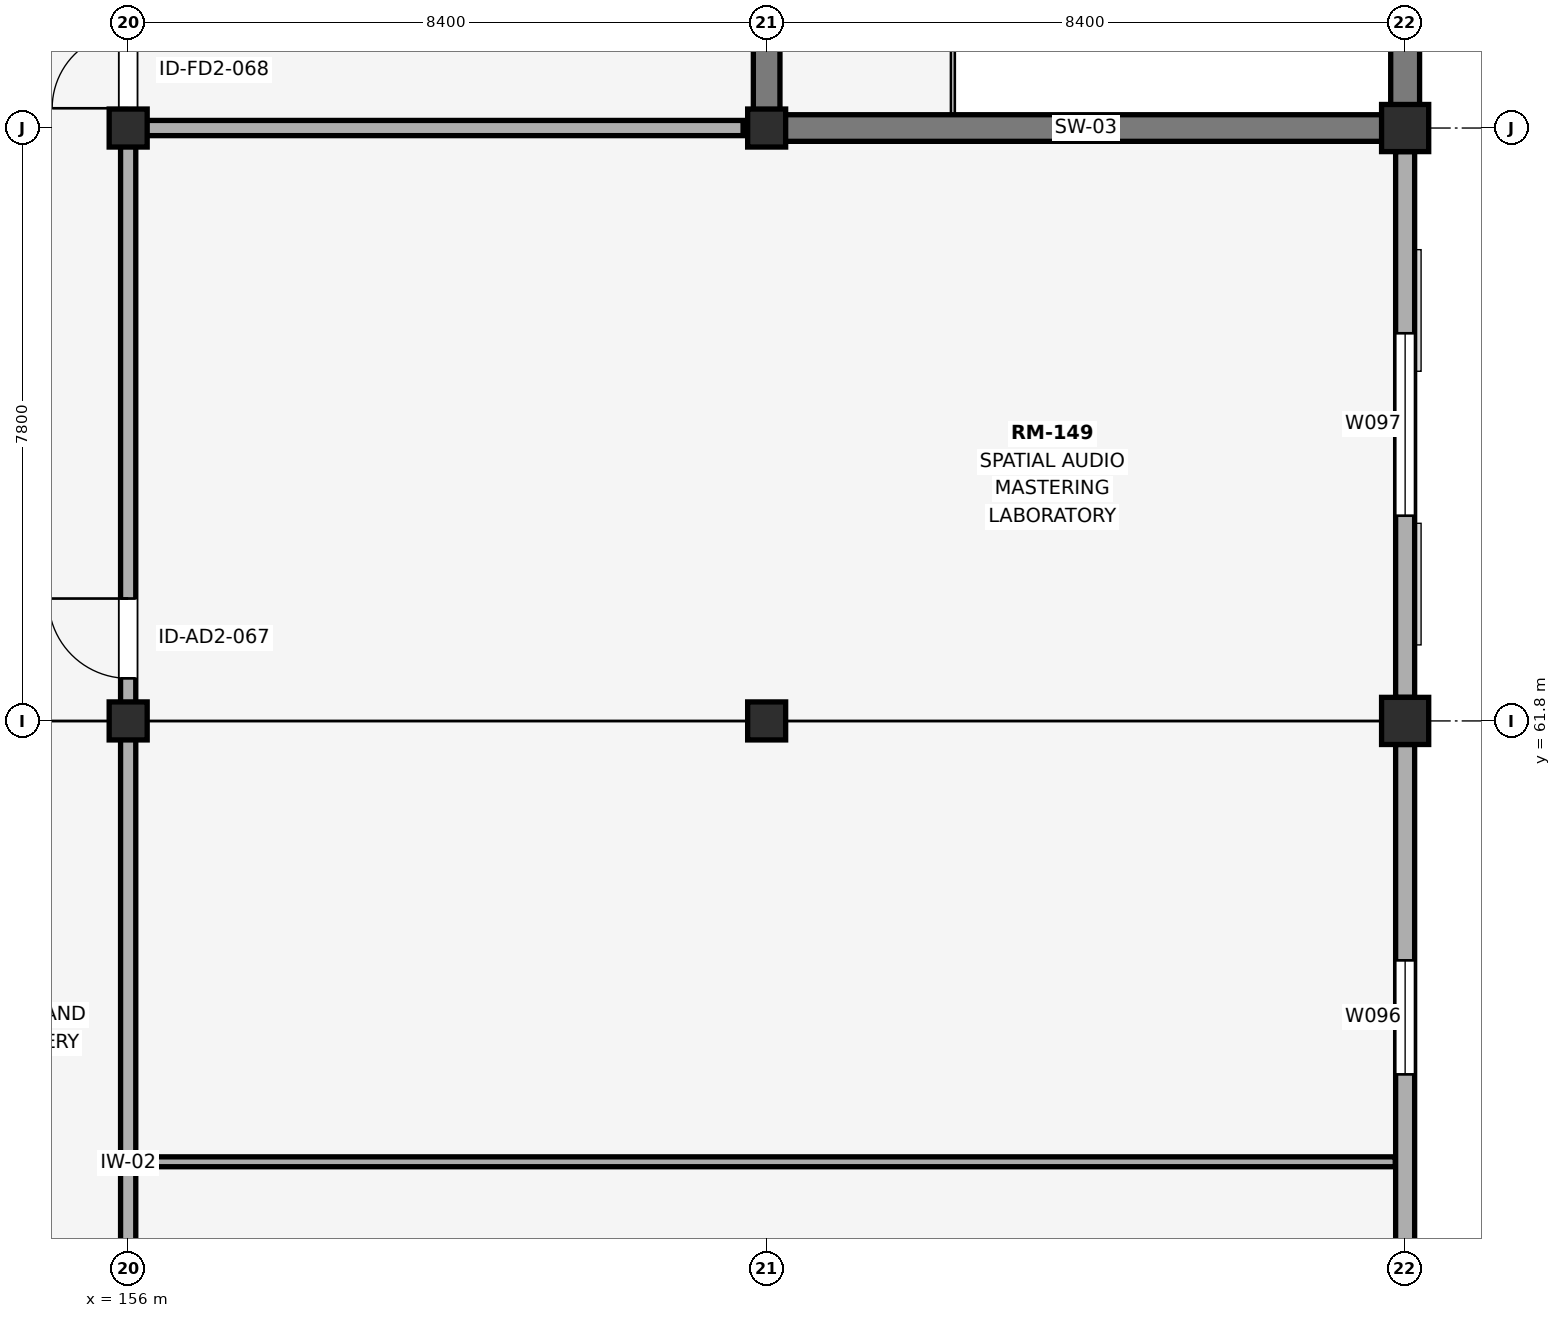
"""IFC4 building model, lengths in metres.
Left out: names, types, materials, properties, quantities, classifications, styles, units other than length and angle.
Written with IfcOpenShell. Run it as: python <this file> out.ifc"""

import sys

from ifc_helpers import new_model, si_unit, direction, frame, frame_2d, origin, origin_2d, place, context, subcontext, project, spatial, rectangle, extrude, element, fill, save


model = new_model("IFC4")
c1 = context("Model", 3, precision=1e-05, world=origin(), true_north=direction((0.0, 1.0)))
c2 = subcontext(c1, "Body", "Model", "MODEL_VIEW")
j1 = project(units=[si_unit("LENGTHUNIT", "METRE"), si_unit("PLANEANGLEUNIT", "RADIAN")], contexts=[c1])
p1 = place(None, origin())
s1 = spatial("IfcSite", under=j1, at=p1, CompositionType="ELEMENT")
p2 = place(p1, origin())
s2 = spatial("IfcBuilding", under=s1, at=p2, CompositionType="ELEMENT")
p3 = place(p2, frame((0.0, 0.0, 24.0)))
s3 = spatial("IfcBuildingStorey", under=s2, at=p3, CompositionType="ELEMENT", Elevation=24.0)
for number, where, z_axis, x_axis in (
    (1, (156.0, 61.8, 0.0), (0.0, 0.0, 1.0), (1.0, 0.0, 0.0)),
    (2, (156.0, 69.6, 0.0), (0.0, 0.0, 1.0), (1.0, 0.0, 0.0)),
    (3, (164.4, 61.8, 0.0), (0.0, 0.0, 1.0), (1.0, 0.0, 0.0)),
    (4, (164.4, 69.6, 0.0), (0.0, 0.0, 1.0), (1.0, 0.0, 0.0)),
):
    element("IfcColumn", number, at=place(p3, frame(where, z_axis=z_axis, x_axis=x_axis)), inside=s3, PredefinedType="COLUMN", context=c2, shape_type="SweptSolid", body=[
        extrude(rectangle(XDim=0.5, YDim=0.5, at=origin_2d()), origin(), (0.0, 0.0, 1.0), 4.5),
    ])
for number, where, z_axis, x_axis in (
    (5, (172.8, 61.8, 0.0), (0.0, 0.0, 1.0), (1.0, 0.0, 0.0)),
    (6, (172.8, 69.6, 0.0), (0.0, 0.0, 1.0), (1.0, 0.0, 0.0)),
):
    element("IfcColumn", number, at=place(p3, frame(where, z_axis=z_axis, x_axis=x_axis)), inside=s3, PredefinedType="COLUMN", context=c2, shape_type="SweptSolid", body=[
        extrude(rectangle(XDim=0.62, YDim=0.62, at=origin_2d()), origin(), (0.0, 0.0, 1.0), 4.5),
    ])
p4 = place(p3, frame((164.225, 69.6, 0.0), z_axis=(0.0, 0.0, 1.0), x_axis=(1.0, 0.0, 0.0)))
e7 = element("IfcWall", 7, at=p4, inside=s3, PredefinedType="SHEAR", context=c2, shape_type="SweptSolid", body=[
    extrude(rectangle(XDim=8.75, YDim=0.35, at=frame_2d((4.375, 0.0))), origin(), (0.0, 0.0, 1.0), 4.5),
])
p5 = place(p3, frame((164.4, 69.775, 0.0), z_axis=(0.0, 0.0, 1.0), x_axis=(0.0, 1.0, 0.0)))
e8 = element("IfcWall", 8, at=p5, inside=s3, PredefinedType="SHEAR", context=c2, shape_type="SweptSolid", body=[
    extrude(rectangle(XDim=7.45, YDim=0.35, at=frame_2d((3.725, 0.0))), origin(), (0.0, 0.0, 1.0), 4.5),
])
p6 = place(p5, frame((2.1, 0.0, 0.0)))
e9 = element("IfcOpeningElement", 9, at=p6, cuts=e8, PredefinedType="OPENING", context=c2, shape_type="SweptSolid", body=[
    extrude(rectangle(XDim=1.1, YDim=2.2, at=frame_2d((0.55, 1.1))), frame((0.0, 0.185, 0.0), z_axis=(0.0, -1.0, 0.0), x_axis=(1.0, 0.0, 0.0)), (0.0, 0.0, 1.0), 0.37),
])
p7 = place(p3, frame((172.8, 69.775, 0.0), z_axis=(0.0, 0.0, 1.0), x_axis=(0.0, 1.0, 0.0)))
e10 = element("IfcWall", 10, at=p7, inside=s3, PredefinedType="SHEAR", context=c2, shape_type="SweptSolid", body=[
    extrude(rectangle(XDim=7.45, YDim=0.38, at=frame_2d((3.725, 0.0))), origin(), (0.0, 0.0, 1.0), 4.5),
])
p8 = place(p3, frame((172.8, 54.31, 0.0), z_axis=(0.0, 0.0, 1.0), x_axis=(0.0, 1.0, 0.0)))
e11 = element("IfcWall", 11, at=p8, inside=s3, PredefinedType="SOLIDWALL", context=c2, shape_type="SweptSolid", body=[
    extrude(rectangle(XDim=7.18, YDim=0.25, at=frame_2d((3.59, 0.0))), origin(), (0.0, 0.0, 1.0), 3.52),
])
p9 = place(p8, frame((2.84, 0.0, 0.9)))
e12 = element("IfcOpeningElement", 12, at=p9, cuts=e11, PredefinedType="OPENING", context=c2, shape_type="SweptSolid", body=[
    extrude(rectangle(XDim=1.5, YDim=2.1, at=frame_2d((0.75, 1.05))), frame((0.0, 0.135, 0.0), z_axis=(0.0, -1.0, 0.0), x_axis=(1.0, 0.0, 0.0)), (0.0, 0.0, 1.0), 0.27),
])
p10 = place(p3, frame((172.8, 62.11, 0.0), z_axis=(0.0, 0.0, 1.0), x_axis=(0.0, 1.0, 0.0)))
e13 = element("IfcWall", 13, at=p10, inside=s3, PredefinedType="SOLIDWALL", context=c2, shape_type="SweptSolid", body=[
    extrude(rectangle(XDim=7.18, YDim=0.25, at=frame_2d((3.59, 0.0))), origin(), (0.0, 0.0, 1.0), 3.52),
])
p11 = place(p10, frame((2.39, 0.0, 0.9)))
e14 = element("IfcOpeningElement", 14, at=p11, cuts=e13, PredefinedType="OPENING", context=c2, shape_type="SweptSolid", body=[
    extrude(rectangle(XDim=2.4, YDim=2.1, at=frame_2d((1.2, 1.05))), frame((0.0, 0.135, 0.0), z_axis=(0.0, -1.0, 0.0), x_axis=(1.0, 0.0, 0.0)), (0.0, 0.0, 1.0), 0.27),
])
p12 = place(p3, frame((156.0, 38.66, 0.0), z_axis=(0.0, 0.0, 1.0), x_axis=(0.0, 1.0, 0.0)))
e15 = element("IfcWall", 15, at=p12, inside=s3, PredefinedType="PARTITIONING", context=c2, shape_type="SweptSolid", body=[
    extrude(rectangle(XDim=38.61, YDim=0.2, at=frame_2d((19.305, 0.0))), origin(), (0.0, 0.0, 1.0), 3.57),
])
p13 = place(p12, frame((8.0, 0.0, 0.0)))
e16 = element("IfcOpeningElement", 16, at=p13, cuts=e15, PredefinedType="OPENING", context=c2, shape_type="SweptSolid", body=[
    extrude(rectangle(XDim=2.0, YDim=2.45, at=frame_2d((1.0, 1.225))), frame((0.0, 0.11, 0.0), z_axis=(0.0, -1.0, 0.0), x_axis=(1.0, 0.0, 0.0)), (0.0, 0.0, 1.0), 0.22),
])
p14 = place(p12, frame((23.7, 0.0, 0.0)))
e17 = element("IfcOpeningElement", 17, at=p14, cuts=e15, PredefinedType="OPENING", context=c2, shape_type="SweptSolid", body=[
    extrude(rectangle(XDim=1.05, YDim=2.25, at=frame_2d((0.525, 1.125))), frame((0.0, 0.11, 0.0), z_axis=(0.0, -1.0, 0.0), x_axis=(1.0, 0.0, 0.0)), (0.0, 0.0, 1.0), 0.22),
])
p15 = place(p12, frame((31.2, 0.0, 0.0)))
e18 = element("IfcOpeningElement", 18, at=p15, cuts=e15, PredefinedType="OPENING", context=c2, shape_type="SweptSolid", body=[
    extrude(rectangle(XDim=1.0, YDim=2.2, at=frame_2d((0.5, 1.1))), frame((0.0, 0.11, 0.0), z_axis=(0.0, -1.0, 0.0), x_axis=(1.0, 0.0, 0.0)), (0.0, 0.0, 1.0), 0.22),
])
p16 = place(p3, frame((156.11, 56.0, 0.0), z_axis=(0.0, 0.0, 1.0), x_axis=(1.0, 0.0, 0.0)))
e19 = element("IfcWall", 19, at=p16, inside=s3, PredefinedType="PARTITIONING", context=c2, shape_type="SweptSolid", body=[
    extrude(rectangle(XDim=16.56, YDim=0.13, at=frame_2d((8.28, 0.0))), origin(), (0.0, 0.0, 1.0), 4.19),
])
p17 = place(p3, frame((156.11, 69.6, 0.0), z_axis=(0.0, 0.0, 1.0), x_axis=(1.0, 0.0, 0.0)))
e20 = element("IfcWall", 20, at=p17, inside=s3, PredefinedType="PARTITIONING", context=c2, shape_type="SweptSolid", body=[
    extrude(rectangle(XDim=7.98, YDim=0.2, at=frame_2d((3.99, 0.0))), origin(), (0.0, 0.0, 1.0), 3.6),
])
p18 = place(p9, origin())
e21 = element("IfcWindow", 21, at=p18, inside=s3, PartitioningType="SINGLE_PANEL", PredefinedType="WINDOW", context=c2, shape_type="SweptSolid", body=[
    extrude(rectangle(XDim=1.5, YDim=2.1, at=frame_2d((0.75, 1.05))), frame((0.0, 0.03, 0.0), z_axis=(0.0, -1.0, 0.0), x_axis=(1.0, 0.0, 0.0)), (0.0, 0.0, 1.0), 0.06),
])
fill(e12, e21)
p19 = place(p11, origin())
e22 = element("IfcWindow", 22, at=p19, inside=s3, PartitioningType="SINGLE_PANEL", PredefinedType="WINDOW", context=c2, shape_type="SweptSolid", body=[
    extrude(rectangle(XDim=2.4, YDim=2.1, at=frame_2d((1.2, 1.05))), frame((0.0, 0.03, 0.0), z_axis=(0.0, -1.0, 0.0), x_axis=(1.0, 0.0, 0.0)), (0.0, 0.0, 1.0), 0.06),
])
fill(e14, e22)
p20 = place(p14, origin())
e23 = element("IfcDoor", 23, at=p20, inside=s3, OperationType="SINGLE_SWING_RIGHT", PredefinedType="DOOR", context=c2, shape_type="SweptSolid", body=[
    extrude(rectangle(XDim=1.05, YDim=2.25, at=frame_2d((0.525, 1.125))), frame((0.0, 0.025, 0.0), z_axis=(0.0, -1.0, 0.0), x_axis=(1.0, 0.0, 0.0)), (0.0, 0.0, 1.0), 0.05),
])
fill(e17, e23)
p21 = place(p15, origin())
e24 = element("IfcDoor", 24, at=p21, inside=s3, OperationType="SINGLE_SWING_LEFT", PredefinedType="DOOR", context=c2, shape_type="SweptSolid", body=[
    extrude(rectangle(XDim=1.0, YDim=2.2, at=frame_2d((0.5, 1.1))), frame((0.0, 0.025, 0.0), z_axis=(0.0, -1.0, 0.0), x_axis=(1.0, 0.0, 0.0)), (0.0, 0.0, 1.0), 0.05),
])
fill(e18, e24)
save(model, sys.argv[1])
